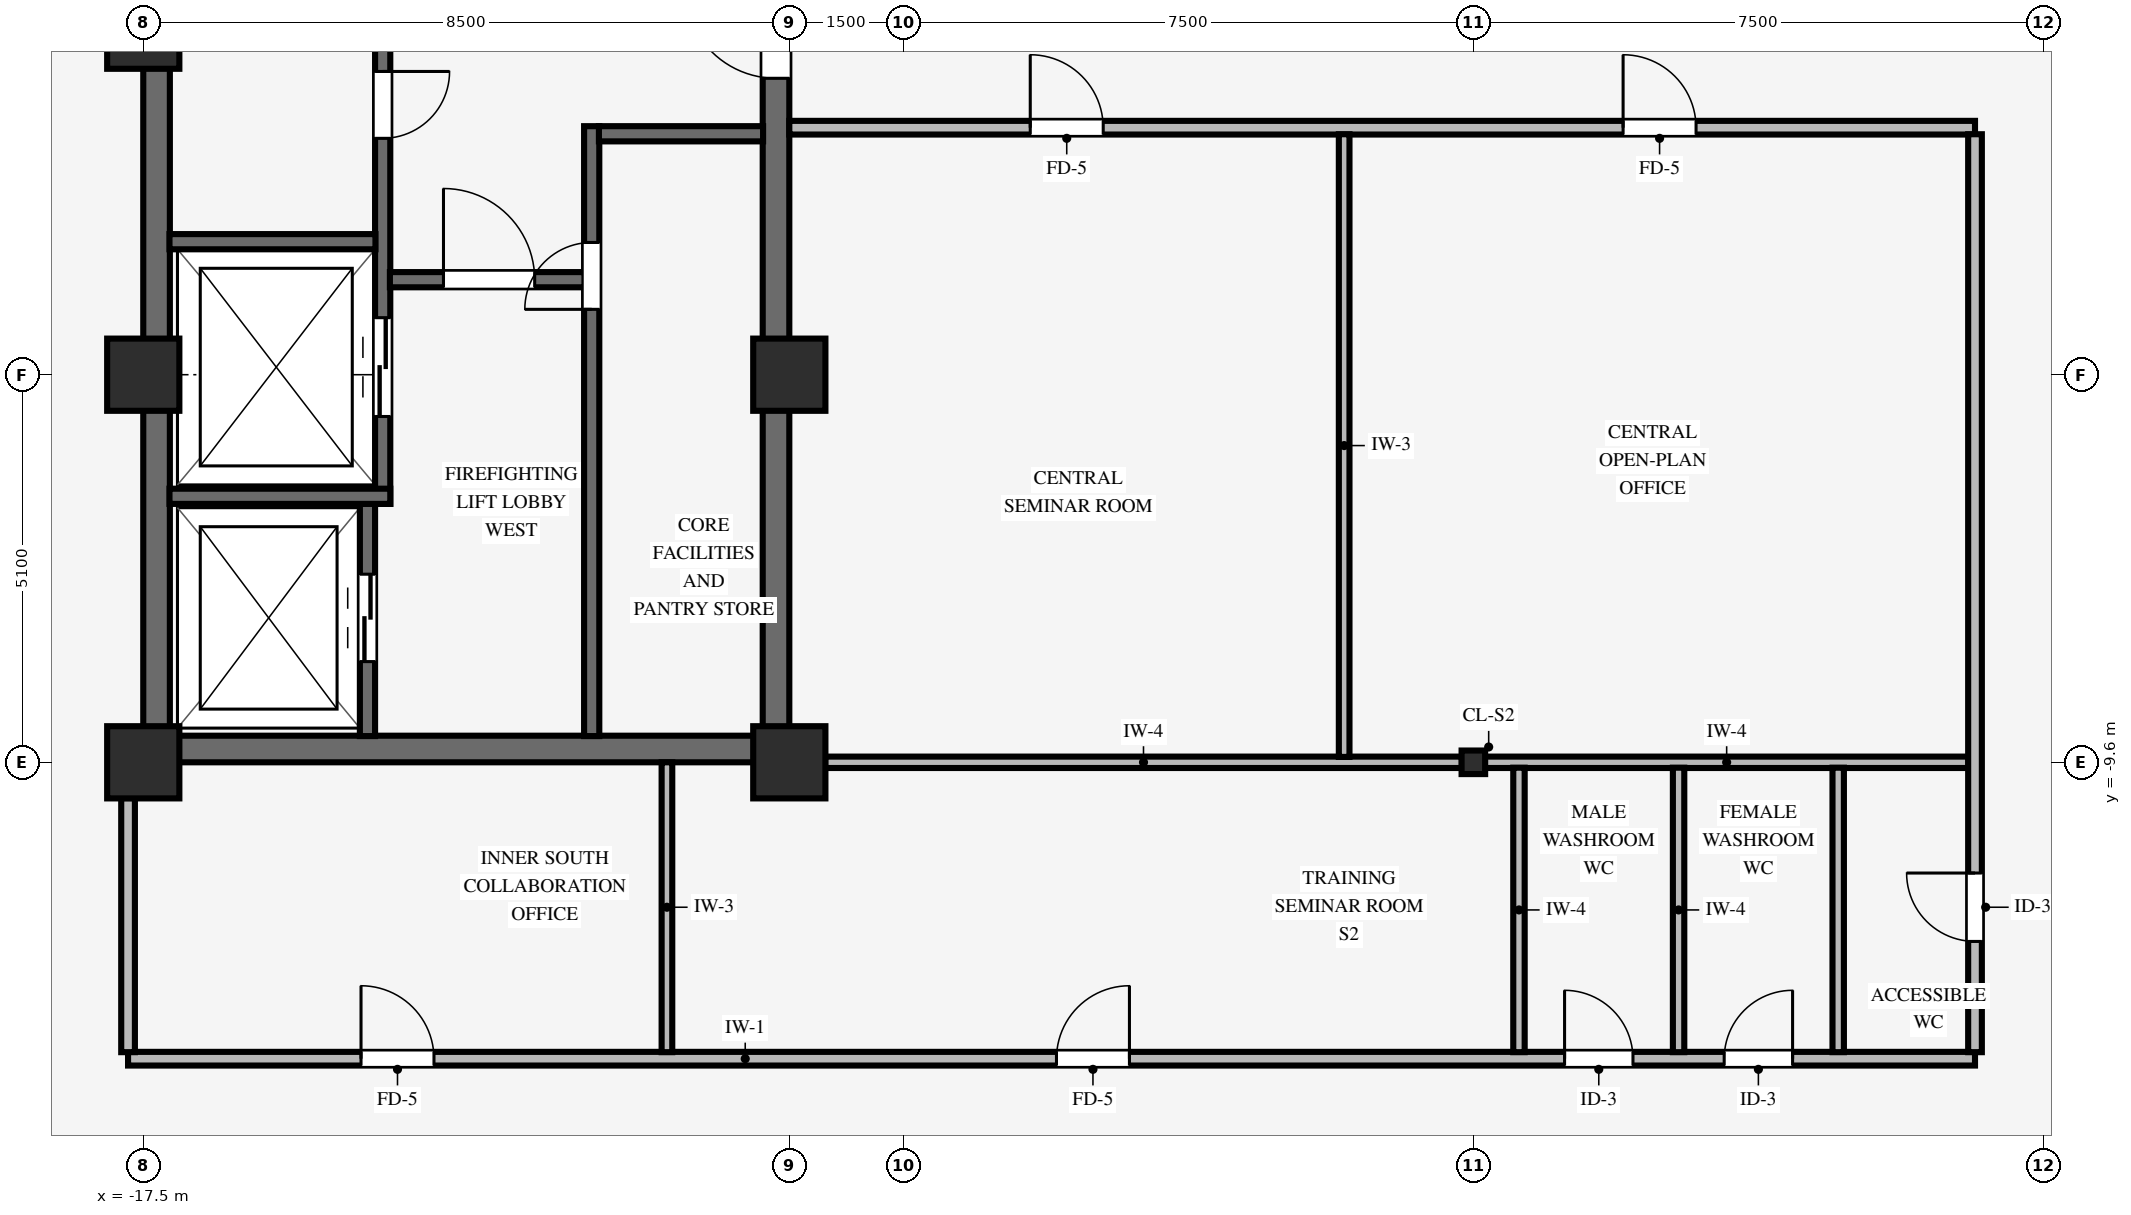
"""IFC4 building model, lengths in metres.
Left out: names, types, materials, properties, quantities, classifications, styles, units other than length and angle.
Written with IfcOpenShell. Run it as: python <this file> out.ifc"""

import sys

from ifc_helpers import new_model, si_unit, direction, frame, frame_2d, origin, origin_2d, place, context, subcontext, project, spatial, rectangle, i_section, extrude, source, transform, mapped, element, fill, save


model = new_model("IFC4")
c1 = context("Model", 3, precision=1e-05, world=origin(), true_north=direction((0.0, 1.0)))
c2 = subcontext(c1, "Body", "Model", "MODEL_VIEW")
j1 = project(units=[si_unit("LENGTHUNIT", "METRE"), si_unit("PLANEANGLEUNIT", "RADIAN")], contexts=[c1])
p1 = place(None, origin())
s1 = spatial("IfcSite", under=j1, at=p1, CompositionType="ELEMENT")
p2 = place(p1, origin())
s2 = spatial("IfcBuilding", under=s1, at=p2, CompositionType="ELEMENT")
p3 = place(p2, frame((0.0, 0.0, 220.1)))
s3 = spatial("IfcBuildingStorey", under=s2, at=p3, CompositionType="ELEMENT", Elevation=220.1)
p4 = place(p3, frame((-17.5, -9.425, 0.0), z_axis=(0.0, 0.0, 1.0), x_axis=(1.0, 0.0, 0.0)))
e1 = element("IfcWall", 1, at=p4, inside=s3, PredefinedType="SHEAR", context=c2, shape_type="SweptSolid", body=[
    extrude(rectangle(XDim=8.5, YDim=0.35, at=frame_2d((4.25, 0.0))), origin(), (0.0, 0.0, 1.0), 3.37),
])
p5 = place(p3, frame((-17.325, -9.255, 0.0), z_axis=(0.0, 0.0, 1.0), x_axis=(0.0, 1.0, 0.0)))
e2 = element("IfcWall", 2, at=p5, inside=s3, PredefinedType="SHEAR", context=c2, shape_type="SweptSolid", body=[
    extrude(rectangle(XDim=18.51, YDim=0.35, at=frame_2d((9.255, 0.0))), origin(), (0.0, 0.0, 1.0), 3.37),
])
p6 = place(p3, frame((-9.175, -9.255, 0.0), z_axis=(0.0, 0.0, 1.0), x_axis=(0.0, 1.0, 0.0)))
e3 = element("IfcWall", 3, at=p6, inside=s3, PredefinedType="SHEAR", context=c2, shape_type="SweptSolid", body=[
    extrude(rectangle(XDim=18.51, YDim=0.35, at=frame_2d((9.255, 0.0))), origin(), (0.0, 0.0, 1.0), 3.37),
])
p7 = place(p6, frame((8.655, 0.0, 0.0)))
e4 = element("IfcOpeningElement", 4, at=p7, cuts=e3, PredefinedType="OPENING", context=c2, shape_type="SweptSolid", body=[
    extrude(rectangle(XDim=1.2, YDim=2.15, at=frame_2d((0.6, 1.075))), frame((0.0, 0.185, 0.0), z_axis=(0.0, -1.0, 0.0), x_axis=(1.0, 0.0, 0.0)), (0.0, 0.0, 1.0), 0.37),
])
for number, where, z_axis, x_axis in (
    (5, (-17.5, -9.6, 0.0), (0.0, 0.0, 1.0), (1.0, 0.0, 0.0)),
    (6, (-17.5, -4.5, 0.0), (0.0, 0.0, 1.0), (1.0, 0.0, 0.0)),
    (7, (-9.0, -9.6, 0.0), (0.0, 0.0, 1.0), (1.0, 0.0, 0.0)),
    (8, (-9.0, -4.5, 0.0), (0.0, 0.0, 1.0), (1.0, 0.0, 0.0)),
    (9, (-17.5, 0.0, 0.0), (0.0, 0.0, 1.0), (1.0, 0.0, 0.0)),
):
    element("IfcColumn", number, at=place(p3, frame(where, z_axis=z_axis, x_axis=x_axis)), inside=s3, PredefinedType="COLUMN", context=c2, shape_type="SweptSolid", body=[
        extrude(rectangle(XDim=0.95, YDim=0.95, at=origin_2d()), origin(), (0.0, 0.0, 1.0), 3.37),
    ])
p8 = place(p3, frame((0.0, -9.6, 0.0), z_axis=(0.0, 0.0, 1.0), x_axis=(1.0, 0.0, 0.0)))
e10 = element("IfcColumn", 10, at=p8, inside=s3, PredefinedType="COLUMN", context=c2, shape_type="SweptSolid", body=[
    extrude(i_section(OverallWidth=0.31, OverallDepth=0.31, WebThickness=0.015, FlangeThickness=0.015, FilletRadius=0.015, at=origin_2d()), origin(), (0.0, 0.0, 1.0), 3.37),
])
p9 = place(p3, frame((-14.55, -9.255, 0.0), z_axis=(0.0, 0.0, 1.0), x_axis=(0.0, 1.0, 0.0)))
e11 = element("IfcWall", 11, at=p9, inside=s3, PredefinedType="SHEAR", context=c2, shape_type="SweptSolid", body=[
    extrude(rectangle(XDim=3.06, YDim=0.2, at=frame_2d((1.53, 0.0))), origin(), (0.0, 0.0, 1.0), 3.37),
])
p10 = place(p9, frame((0.98, 0.0, 0.0)))
e12 = element("IfcOpeningElement", 12, at=p10, cuts=e11, PredefinedType="OPENING", context=c2, shape_type="SweptSolid", body=[
    extrude(rectangle(XDim=1.15, YDim=2.15, at=frame_2d((0.575, 1.075))), frame((0.0, 0.11, 0.0), z_axis=(0.0, -1.0, 0.0), x_axis=(1.0, 0.0, 0.0)), (0.0, 0.0, 1.0), 0.22),
])
p11 = place(p3, frame((-14.35, -6.2, 0.0), z_axis=(0.0, 0.0, 1.0), x_axis=(0.0, 1.0, 0.0)))
e13 = element("IfcWall", 13, at=p11, inside=s3, PredefinedType="SHEAR", context=c2, shape_type="SweptSolid", body=[
    extrude(rectangle(XDim=7.105, YDim=0.2, at=frame_2d((3.552, 0.0))), origin(), (0.0, 0.0, 1.0), 3.37),
])
p12 = place(p11, frame((5.69, 0.0, 0.0), z_axis=(0.0, 0.0, 1.0), x_axis=(-1.0, 0.0, 0.0)))
e14 = element("IfcOpeningElement", 14, at=p12, cuts=e13, PredefinedType="OPENING", context=c2, shape_type="SweptSolid", body=[
    extrude(rectangle(XDim=0.88, YDim=2.1, at=frame_2d((0.44, 1.05))), frame((0.0, 0.11, 0.0), z_axis=(0.0, -1.0, 0.0), x_axis=(1.0, 0.0, 0.0)), (0.0, 0.0, 1.0), 0.22),
])
p13 = place(p11, frame((1.15, 0.0, 0.0)))
e15 = element("IfcOpeningElement", 15, at=p13, cuts=e13, PredefinedType="OPENING", context=c2, shape_type="SweptSolid", body=[
    extrude(rectangle(XDim=1.3, YDim=2.2, at=frame_2d((0.65, 1.1))), frame((0.0, 0.11, 0.0), z_axis=(0.0, -1.0, 0.0), x_axis=(1.0, 0.0, 0.0)), (0.0, 0.0, 1.0), 0.22),
])
p14 = place(p3, frame((-17.155, -6.1, 0.0), z_axis=(0.0, 0.0, 1.0), x_axis=(1.0, 0.0, 0.0)))
e16 = element("IfcWall", 16, at=p14, inside=s3, PredefinedType="SHEAR", context=c2, shape_type="SweptSolid", body=[
    extrude(rectangle(XDim=2.905, YDim=0.2, at=frame_2d((1.453, 0.0))), origin(), (0.0, 0.0, 1.0), 3.37),
])
p15 = place(p3, frame((-17.155, -2.75, 0.0), z_axis=(0.0, 0.0, 1.0), x_axis=(1.0, 0.0, 0.0)))
e17 = element("IfcWall", 17, at=p15, inside=s3, PredefinedType="SHEAR", context=c2, shape_type="SweptSolid", body=[
    extrude(rectangle(XDim=2.71, YDim=0.2, at=frame_2d((1.355, 0.0))), origin(), (0.0, 0.0, 1.0), 3.37),
])
p16 = place(p3, frame((-11.6, -9.255, 0.0), z_axis=(0.0, 0.0, 1.0), x_axis=(0.0, 1.0, 0.0)))
e18 = element("IfcWall", 18, at=p16, inside=s3, PredefinedType="SHEAR", context=c2, shape_type="SweptSolid", body=[
    extrude(rectangle(XDim=8.025, YDim=0.2, at=frame_2d((4.012, 0.0))), origin(), (0.0, 0.0, 1.0), 3.37),
])
p17 = place(p16, frame((5.615, 0.0, 0.0)))
e19 = element("IfcOpeningElement", 19, at=p17, cuts=e18, PredefinedType="OPENING", context=c2, shape_type="SweptSolid", body=[
    extrude(rectangle(XDim=0.88, YDim=2.1, at=frame_2d((0.44, 1.05))), frame((0.0, 0.11, 0.0), z_axis=(0.0, -1.0, 0.0), x_axis=(1.0, 0.0, 0.0)), (0.0, 0.0, 1.0), 0.22),
])
p18 = place(p3, frame((-14.255, -3.25, 0.0), z_axis=(0.0, 0.0, 1.0), x_axis=(1.0, 0.0, 0.0)))
e20 = element("IfcWall", 20, at=p18, inside=s3, PredefinedType="SHEAR", context=c2, shape_type="SweptSolid", body=[
    extrude(rectangle(XDim=2.56, YDim=0.2, at=frame_2d((1.28, 0.0))), origin(), (0.0, 0.0, 1.0), 3.37),
])
p19 = place(p18, frame((0.705, 0.0, 0.0)))
e21 = element("IfcOpeningElement", 21, at=p19, cuts=e20, PredefinedType="OPENING", context=c2, shape_type="SweptSolid", body=[
    extrude(rectangle(XDim=1.2, YDim=2.15, at=frame_2d((0.6, 1.075))), frame((0.0, 0.11, 0.0), z_axis=(0.0, -1.0, 0.0), x_axis=(1.0, 0.0, 0.0)), (0.0, 0.0, 1.0), 0.22),
])
p20 = place(p3, frame((-11.505, -1.33, 0.0), z_axis=(0.0, 0.0, 1.0), x_axis=(1.0, 0.0, 0.0)))
e22 = element("IfcWall", 22, at=p20, inside=s3, PredefinedType="SHEAR", context=c2, shape_type="SweptSolid", body=[
    extrude(rectangle(XDim=2.16, YDim=0.2, at=frame_2d((1.08, 0.0))), origin(), (0.0, 0.0, 1.0), 3.37),
])
p21 = place(p3, frame((-17.7, -13.5, 0.0), z_axis=(0.0, 0.0, 1.0), x_axis=(1.0, 0.0, 0.0)))
e23 = element("IfcWall", 23, at=p21, inside=s3, PredefinedType="PARTITIONING", context=c2, shape_type="SweptSolid", body=[
    extrude(rectangle(XDim=24.3, YDim=0.18, at=frame_2d((12.15, 0.0))), origin(), (0.0, 0.0, 1.0), 3.008),
])
p22 = place(p21, frame((12.215, 0.0, 0.0)))
e24 = element("IfcOpeningElement", 24, at=p22, cuts=e23, PredefinedType="OPENING", context=c2, shape_type="SweptSolid", body=[
    extrude(rectangle(XDim=0.96, YDim=2.1, at=frame_2d((0.48, 1.05))), frame((0.0, 0.1, 0.0), z_axis=(0.0, -1.0, 0.0), x_axis=(1.0, 0.0, 0.0)), (0.0, 0.0, 1.0), 0.2),
])
p23 = place(p21, frame((3.065, 0.0, 0.0)))
e25 = element("IfcOpeningElement", 25, at=p23, cuts=e23, PredefinedType="OPENING", context=c2, shape_type="SweptSolid", body=[
    extrude(rectangle(XDim=0.96, YDim=2.1, at=frame_2d((0.48, 1.05))), frame((0.0, 0.1, 0.0), z_axis=(0.0, -1.0, 0.0), x_axis=(1.0, 0.0, 0.0)), (0.0, 0.0, 1.0), 0.2),
])
p24 = place(p21, frame((18.9, 0.0, 0.0)))
e26 = element("IfcOpeningElement", 26, at=p24, cuts=e23, PredefinedType="OPENING", context=c2, shape_type="SweptSolid", body=[
    extrude(rectangle(XDim=0.9, YDim=2.1, at=frame_2d((0.45, 1.05))), frame((0.0, 0.1, 0.0), z_axis=(0.0, -1.0, 0.0), x_axis=(1.0, 0.0, 0.0)), (0.0, 0.0, 1.0), 0.2),
])
p25 = place(p21, frame((21.0, 0.0, 0.0)))
e27 = element("IfcOpeningElement", 27, at=p25, cuts=e23, PredefinedType="OPENING", context=c2, shape_type="SweptSolid", body=[
    extrude(rectangle(XDim=0.9, YDim=2.1, at=frame_2d((0.45, 1.05))), frame((0.0, 0.1, 0.0), z_axis=(0.0, -1.0, 0.0), x_axis=(1.0, 0.0, 0.0)), (0.0, 0.0, 1.0), 0.2),
])
p26 = place(p3, frame((-8.529, -9.6, 0.0), z_axis=(0.0, 0.0, 1.0), x_axis=(1.0, 0.0, 0.0)))
e28 = element("IfcWall", 28, at=p26, inside=s3, PredefinedType="PARTITIONING", context=c2, shape_type="SweptSolid", body=[
    extrude(rectangle(XDim=8.378, YDim=0.15, at=frame_2d((4.189, 0.0))), origin(), (0.0, 0.0, 1.0), 2.405),
])
p27 = place(p3, frame((0.151, -9.6, 0.0), z_axis=(0.0, 0.0, 1.0), x_axis=(1.0, 0.0, 0.0)))
e29 = element("IfcWall", 29, at=p27, inside=s3, PredefinedType="PARTITIONING", context=c2, shape_type="SweptSolid", body=[
    extrude(rectangle(XDim=6.363, YDim=0.15, at=frame_2d((3.182, 0.0))), origin(), (0.0, 0.0, 1.0), 2.405),
])
p28 = place(p3, frame((-9.0, -1.25, 0.0), z_axis=(0.0, 0.0, 1.0), x_axis=(1.0, 0.0, 0.0)))
e30 = element("IfcWall", 30, at=p28, inside=s3, PredefinedType="PARTITIONING", context=c2, shape_type="SweptSolid", body=[
    extrude(rectangle(XDim=15.6, YDim=0.18, at=frame_2d((7.8, 0.0))), origin(), (0.0, 0.0, 1.0), 3.36),
])
p29 = place(p28, frame((10.97, 0.0, 0.0)))
e31 = element("IfcOpeningElement", 31, at=p29, cuts=e30, PredefinedType="OPENING", context=c2, shape_type="SweptSolid", body=[
    extrude(rectangle(XDim=0.96, YDim=2.1, at=frame_2d((0.48, 1.05))), frame((0.0, 0.1, 0.0), z_axis=(0.0, -1.0, 0.0), x_axis=(1.0, 0.0, 0.0)), (0.0, 0.0, 1.0), 0.2),
])
p30 = place(p28, frame((3.17, 0.0, 0.0)))
e32 = element("IfcOpeningElement", 32, at=p30, cuts=e30, PredefinedType="OPENING", context=c2, shape_type="SweptSolid", body=[
    extrude(rectangle(XDim=0.96, YDim=2.1, at=frame_2d((0.48, 1.05))), frame((0.0, 0.1, 0.0), z_axis=(0.0, -1.0, 0.0), x_axis=(1.0, 0.0, 0.0)), (0.0, 0.0, 1.0), 0.2),
])
p31 = place(p3, frame((-17.7, -13.414, 0.0), z_axis=(0.0, 0.0, 1.0), x_axis=(0.0, 1.0, 0.0)))
e33 = element("IfcWall", 33, at=p31, inside=s3, PredefinedType="PARTITIONING", context=c2, shape_type="SweptSolid", body=[
    extrude(rectangle(XDim=3.343, YDim=0.18, at=frame_2d((1.671, 0.0))), origin(), (0.0, 0.0, 1.0), 2.816),
])
p32 = place(p3, frame((-10.61, -13.414, 0.0), z_axis=(0.0, 0.0, 1.0), x_axis=(0.0, 1.0, 0.0)))
e34 = element("IfcWall", 34, at=p32, inside=s3, PredefinedType="PARTITIONING", context=c2, shape_type="SweptSolid", body=[
    extrude(rectangle(XDim=3.814, YDim=0.14, at=frame_2d((1.907, 0.0))), origin(), (0.0, 0.0, 1.0), 3.36),
])
p33 = place(p3, frame((-1.7, -9.529, 0.0), z_axis=(0.0, 0.0, 1.0), x_axis=(0.0, 1.0, 0.0)))
e35 = element("IfcWall", 35, at=p33, inside=s3, PredefinedType="PARTITIONING", context=c2, shape_type="SweptSolid", body=[
    extrude(rectangle(XDim=8.193, YDim=0.14, at=frame_2d((4.097, 0.0))), origin(), (0.0, 0.0, 1.0), 3.36),
])
for number, where, z_axis, x_axis in (
    (36, (0.6, -13.414, 0.0), (0.0, 0.0, 1.0), (0.0, 1.0, 0.0)),
    (37, (2.7, -13.414, 0.0), (0.0, 0.0, 1.0), (0.0, 1.0, 0.0)),
    (38, (4.8, -13.414, 0.0), (0.0, 0.0, 1.0), (0.0, 1.0, 0.0)),
):
    element("IfcWall", number, at=place(p3, frame(where, z_axis=z_axis, x_axis=x_axis)), inside=s3, PredefinedType="PARTITIONING", context=c2, shape_type="SweptSolid", body=[
        extrude(rectangle(XDim=3.743, YDim=0.15, at=frame_2d((1.872, 0.0))), origin(), (0.0, 0.0, 1.0), 3.36),
    ])
p34 = place(p3, frame((6.6, -13.414, 0.0), z_axis=(0.0, 0.0, 1.0), x_axis=(0.0, 1.0, 0.0)))
e39 = element("IfcWall", 39, at=p34, inside=s3, PredefinedType="PARTITIONING", context=c2, shape_type="SweptSolid", body=[
    extrude(rectangle(XDim=12.078, YDim=0.18, at=frame_2d((6.039, 0.0))), origin(), (0.0, 0.0, 1.0), 3.36),
])
p35 = place(p34, frame((1.457, 0.0, 0.0)))
e40 = element("IfcOpeningElement", 40, at=p35, cuts=e39, PredefinedType="OPENING", context=c2, shape_type="SweptSolid", body=[
    extrude(rectangle(XDim=0.9, YDim=2.1, at=frame_2d((0.45, 1.05))), frame((0.0, 0.1, 0.0), z_axis=(0.0, -1.0, 0.0), x_axis=(1.0, 0.0, 0.0)), (0.0, 0.0, 1.0), 0.2),
])
m1 = source(origin(), c2, "Body", "SweptSolid", [
    extrude(rectangle(XDim=0.88, YDim=2.1, at=frame_2d((0.44, 1.05))), frame((0.0, 0.025, 0.0), z_axis=(0.0, -1.0, 0.0), x_axis=(1.0, 0.0, 0.0)), (0.0, 0.0, 1.0), 0.05),
])
p36 = place(p12, origin())
e41 = element("IfcDoor", 41, at=p36, inside=s3, OperationType="SINGLE_SWING_LEFT", PredefinedType="DOOR", context=c2, shape_type="MappedRepresentation", body=[
    mapped(m1, transform((0.0, 0.0, 0.0), scale=1.0)),
])
fill(e14, e41)
m2 = source(origin(), c2, "Body", "SweptSolid", [
    extrude(rectangle(XDim=1.2, YDim=2.15, at=frame_2d((0.6, 1.075))), frame((0.0, 0.025, 0.0), z_axis=(0.0, -1.0, 0.0), x_axis=(1.0, 0.0, 0.0)), (0.0, 0.0, 1.0), 0.05),
])
p37 = place(p19, origin())
e42 = element("IfcDoor", 42, at=p37, inside=s3, OperationType="SINGLE_SWING_LEFT", PredefinedType="DOOR", context=c2, shape_type="MappedRepresentation", body=[
    mapped(m2, transform((0.0, 0.0, 0.0), scale=1.0)),
])
fill(e21, e42)
p38 = place(p17, origin())
e43 = element("IfcDoor", 43, at=p38, inside=s3, OperationType="SINGLE_SWING_LEFT", PredefinedType="DOOR", context=c2, shape_type="MappedRepresentation", body=[
    mapped(m1, transform((0.0, 0.0, 0.0), scale=1.0)),
])
fill(e19, e43)
p39 = place(p7, origin())
e44 = element("IfcDoor", 44, at=p39, inside=s3, OperationType="SINGLE_SWING_RIGHT", PredefinedType="DOOR", context=c2, shape_type="MappedRepresentation", body=[
    mapped(m2, transform((0.0, 0.0, 0.0), scale=1.0)),
])
fill(e4, e44)
m3 = source(origin(), c2, "Body", "SweptSolid", [
    extrude(rectangle(XDim=1.15, YDim=2.15, at=frame_2d((0.575, 1.075))), frame((0.0, 0.025, 0.0), z_axis=(0.0, -1.0, 0.0), x_axis=(1.0, 0.0, 0.0)), (0.0, 0.0, 1.0), 0.05),
])
p40 = place(p10, origin())
e45 = element("IfcDoor", 45, at=p40, inside=s3, OperationType="DOUBLE_DOOR_SLIDING", PredefinedType="DOOR", context=c2, shape_type="MappedRepresentation", body=[
    mapped(m3, transform((0.0, 0.0, 0.0), scale=1.0)),
])
fill(e12, e45)
m4 = source(origin(), c2, "Body", "SweptSolid", [
    extrude(rectangle(XDim=1.3, YDim=2.2, at=frame_2d((0.65, 1.1))), frame((0.0, 0.025, 0.0), z_axis=(0.0, -1.0, 0.0), x_axis=(1.0, 0.0, 0.0)), (0.0, 0.0, 1.0), 0.05),
])
p41 = place(p13, origin())
e46 = element("IfcDoor", 46, at=p41, inside=s3, OperationType="DOUBLE_DOOR_SLIDING", PredefinedType="DOOR", context=c2, shape_type="MappedRepresentation", body=[
    mapped(m4, transform((0.0, 0.0, 0.0), scale=1.0)),
])
fill(e15, e46)
m5 = source(origin(), c2, "Body", "SweptSolid", [
    extrude(rectangle(XDim=0.96, YDim=2.1, at=frame_2d((0.48, 1.05))), frame((0.0, 0.025, 0.0), z_axis=(0.0, -1.0, 0.0), x_axis=(1.0, 0.0, 0.0)), (0.0, 0.0, 1.0), 0.05),
])
p42 = place(p22, origin())
e47 = element("IfcDoor", 47, at=p42, inside=s3, OperationType="SINGLE_SWING_RIGHT", PredefinedType="DOOR", context=c2, shape_type="MappedRepresentation", body=[
    mapped(m5, transform((0.0, 0.0, 0.0), scale=1.0)),
])
fill(e24, e47)
p43 = place(p29, origin())
e48 = element("IfcDoor", 48, at=p43, inside=s3, OperationType="SINGLE_SWING_LEFT", PredefinedType="DOOR", context=c2, shape_type="MappedRepresentation", body=[
    mapped(m5, transform((0.0, 0.0, 0.0), scale=1.0)),
])
fill(e31, e48)
p44 = place(p30, origin())
e49 = element("IfcDoor", 49, at=p44, inside=s3, OperationType="SINGLE_SWING_LEFT", PredefinedType="DOOR", context=c2, shape_type="MappedRepresentation", body=[
    mapped(m5, transform((0.0, 0.0, 0.0), scale=1.0)),
])
fill(e32, e49)
p45 = place(p23, origin())
e50 = element("IfcDoor", 50, at=p45, inside=s3, OperationType="SINGLE_SWING_LEFT", PredefinedType="DOOR", context=c2, shape_type="MappedRepresentation", body=[
    mapped(m5, transform((0.0, 0.0, 0.0), scale=1.0)),
])
fill(e25, e50)
m6 = source(origin(), c2, "Body", "SweptSolid", [
    extrude(rectangle(XDim=0.9, YDim=2.1, at=frame_2d((0.45, 1.05))), frame((0.0, 0.025, 0.0), z_axis=(0.0, -1.0, 0.0), x_axis=(1.0, 0.0, 0.0)), (0.0, 0.0, 1.0), 0.05),
])
p46 = place(p35, origin())
e51 = element("IfcDoor", 51, at=p46, inside=s3, OperationType="SINGLE_SWING_RIGHT", PredefinedType="DOOR", context=c2, shape_type="MappedRepresentation", body=[
    mapped(m6, transform((0.0, 0.0, 0.0), scale=1.0)),
])
fill(e40, e51)
p47 = place(p24, origin())
e52 = element("IfcDoor", 52, at=p47, inside=s3, OperationType="SINGLE_SWING_LEFT", PredefinedType="DOOR", context=c2, shape_type="MappedRepresentation", body=[
    mapped(m6, transform((0.0, 0.0, 0.0), scale=1.0)),
])
fill(e26, e52)
p48 = place(p25, origin())
e53 = element("IfcDoor", 53, at=p48, inside=s3, OperationType="SINGLE_SWING_RIGHT", PredefinedType="DOOR", context=c2, shape_type="MappedRepresentation", body=[
    mapped(m6, transform((0.0, 0.0, 0.0), scale=1.0)),
])
fill(e27, e53)
save(model, sys.argv[1])
